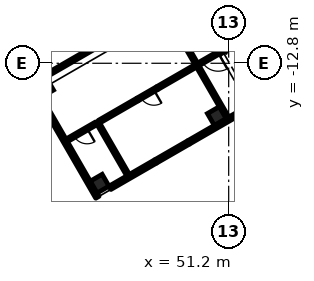
"""IFC4 building model, lengths in metres.
Left out: names, types, materials, properties, quantities, classifications, styles, units other than length and angle.
Written with IfcOpenShell. Run it as: python <this file> out.ifc"""

import sys

from ifc_helpers import new_model, si_unit, direction, frame, frame_2d, origin, origin_2d, place, context, subcontext, project, spatial, rectangle, extrude, element, fill, save


model = new_model("IFC4")
c1 = context("Model", 3, precision=1e-05, world=origin(), true_north=direction((0.0, 1.0)))
c2 = subcontext(c1, "Body", "Model", "MODEL_VIEW")
j1 = project(units=[si_unit("LENGTHUNIT", "METRE"), si_unit("PLANEANGLEUNIT", "RADIAN")], contexts=[c1])
p1 = place(None, origin())
s1 = spatial("IfcSite", under=j1, at=p1, CompositionType="ELEMENT")
p2 = place(p1, origin())
s2 = spatial("IfcBuilding", under=s1, at=p2, CompositionType="ELEMENT")
p3 = place(p2, frame((0.0, 0.0, 16.2)))
s3 = spatial("IfcBuildingStorey", under=s2, at=p3, CompositionType="ELEMENT", Elevation=16.2)
for number, where, z_axis, x_axis in (
    (1, (42.71, -20.721, 0.0), (0.0, 0.0, 1.0), (-0.5, 0.866, 0.0)),
    (2, (50.418, -16.271, 0.0), (0.0, 0.0, 1.0), (-0.5, 0.866, 0.0)),
    (3, (39.061, -14.399, 0.0), (0.0, 0.0, 1.0), (-0.5, 0.866, 0.0)),
):
    element("IfcColumn", number, at=place(p3, frame(where, z_axis=z_axis, x_axis=x_axis)), inside=s3, PredefinedType="COLUMN", context=c2, shape_type="SweptSolid", body=[
        extrude(rectangle(XDim=0.9, YDim=0.9, at=origin_2d()), origin(), (0.0, 0.0, 1.0), 5.4),
    ])
p4 = place(p3, frame((42.562, -21.615, 0.0), z_axis=(0.0, 0.0, 1.0), x_axis=(-0.499999331568, 0.866025789703, 0.0)))
e4 = element("IfcWall", 4, at=p4, inside=s3, PredefinedType="SOLIDWALL", context=c2, shape_type="SweptSolid", body=[
    extrude(rectangle(XDim=8.625, YDim=0.25, at=frame_2d((4.312, 0.0))), origin(), (0.0, 0.0, 1.0), 5.0),
])
p5 = place(p3, frame((46.397, -19.256, 0.0), z_axis=(0.0, 0.0, 1.0), x_axis=(-0.866025305473, -0.500000170281, 0.0)))
e5 = element("IfcWall", 5, at=p5, inside=s3, PredefinedType="SOLIDWALL", context=c2, shape_type="SweptSolid", body=[
    extrude(rectangle(XDim=3.475, YDim=0.25, at=frame_2d((1.738, 0.0))), origin(), (0.0, 0.0, 1.0), 5.0),
])
p6 = place(p3, frame((48.562, -18.006, 0.0), z_axis=(0.0, 0.0, 1.0), x_axis=(-0.866022959057, -0.500004234368, 0.0)))
e6 = element("IfcWall", 6, at=p6, inside=s3, PredefinedType="SOLIDWALL", context=c2, shape_type="SweptSolid", body=[
    extrude(rectangle(XDim=2.5, YDim=0.25, at=frame_2d((1.25, 0.0))), origin(), (0.0, 0.0, 1.0), 5.0),
])
p7 = place(p6, frame((0.25, 0.0, 0.9)))
e7 = element("IfcOpeningElement", 7, at=p7, cuts=e6, PredefinedType="OPENING", context=c2, shape_type="SweptSolid", body=[
    extrude(rectangle(XDim=2.0, YDim=1.8, at=frame_2d((1.0, 0.9))), frame((0.0, 0.135, 0.0), z_axis=(0.0, -1.0, 0.0), x_axis=(1.0, 0.0, 0.0)), (0.0, 0.0, 1.0), 0.27),
])
p8 = place(p3, frame((58.63, -12.194, 0.0), z_axis=(0.0, 0.0, 1.0), x_axis=(-0.866027159341, -0.499996959274, 0.0)))
e8 = element("IfcWall", 8, at=p8, inside=s3, PredefinedType="SOLIDWALL", context=c2, shape_type="SweptSolid", body=[
    extrude(rectangle(XDim=11.625, YDim=0.25, at=frame_2d((5.812, 0.0))), origin(), (0.0, 0.0, 1.0), 5.0),
])
p9 = place(p3, frame((51.119, -16.385, 0.0), z_axis=(0.0, 0.0, 1.0), x_axis=(-0.49999894854, 0.866026010844, 0.0)))
e9 = element("IfcWall", 9, at=p9, inside=s3, PredefinedType="SOLIDWALL", context=c2, shape_type="SweptSolid", body=[
    extrude(rectangle(XDim=4.0, YDim=0.2, at=frame_2d((2.0, 0.0))), origin(), (0.0, 0.0, 1.0), 5.0),
])
p10 = place(p3, frame((50.722, -11.996, 0.0), z_axis=(0.0, 0.0, 1.0), x_axis=(-0.866036909293, -0.499980071345, 0.0)))
e10 = element("IfcWall", 10, at=p10, inside=s3, PredefinedType="SOLIDWALL", context=c2, shape_type="SweptSolid", body=[
    extrude(rectangle(XDim=1.75, YDim=0.2, at=frame_2d((0.875, 0.0))), origin(), (0.0, 0.0, 1.0), 5.0),
])
p11 = place(p10, frame((0.25, 0.0, 0.0)))
e11 = element("IfcOpeningElement", 11, at=p11, cuts=e10, PredefinedType="OPENING", context=c2, shape_type="SweptSolid", body=[
    extrude(rectangle(XDim=1.2, YDim=2.1, at=frame_2d((0.6, 1.05))), frame((0.0, 0.11, 0.0), z_axis=(0.0, -1.0, 0.0), x_axis=(1.0, 0.0, 0.0)), (0.0, 0.0, 1.0), 0.22),
])
p12 = place(p3, frame((50.722, -11.996, 0.0), z_axis=(0.0, 0.0, 1.0), x_axis=(0.866027239912, 0.49999681972, 0.0)))
e12 = element("IfcWall", 12, at=p12, inside=s3, PredefinedType="SOLIDWALL", context=c2, shape_type="SweptSolid", body=[
    extrude(rectangle(XDim=6.65, YDim=0.2, at=frame_2d((3.325, 0.0))), origin(), (0.0, 0.0, 1.0), 5.0),
])
p13 = place(p3, frame((49.07, -12.835, 0.0), z_axis=(0.0, 0.0, 1.0), x_axis=(-0.500062241894, 0.865989465428, 0.0)))
e13 = element("IfcWall", 13, at=p13, inside=s3, PredefinedType="PARTITIONING", context=c2, shape_type="SweptSolid", body=[
    extrude(rectangle(XDim=1.7, YDim=0.2, at=frame_2d((0.85, 0.0))), origin(), (0.0, 0.0, 1.0), 4.1),
])
p14 = place(p3, frame((44.581, -20.16, 0.0), z_axis=(0.0, 0.0, 1.0), x_axis=(-0.49999894854, 0.866026010844, 0.0)))
e14 = element("IfcWall", 14, at=p14, inside=s3, PredefinedType="PARTITIONING", context=c2, shape_type="SweptSolid", body=[
    extrude(rectangle(XDim=4.0, YDim=0.2, at=frame_2d((2.0, 0.0))), origin(), (0.0, 0.0, 1.0), 4.1),
])
p15 = place(p3, frame((42.494, -16.746, 0.0), z_axis=(0.0, 0.0, 1.0), x_axis=(-0.866017533419, -0.500013631625, 0.0)))
e15 = element("IfcWall", 15, at=p15, inside=s3, PredefinedType="PARTITIONING", context=c2, shape_type="SweptSolid", body=[
    extrude(rectangle(XDim=2.25, YDim=0.2, at=frame_2d((1.125, 0.0))), origin(), (0.0, 0.0, 1.0), 4.1),
])
p16 = place(p15, frame((0.7, 0.0, 0.0)))
e16 = element("IfcOpeningElement", 16, at=p16, cuts=e15, PredefinedType="OPENING", context=c2, shape_type="SweptSolid", body=[
    extrude(rectangle(XDim=1.0, YDim=2.1, at=frame_2d((0.5, 1.05))), frame((0.0, 0.11, 0.0), z_axis=(0.0, -1.0, 0.0), x_axis=(1.0, 0.0, 0.0)), (0.0, 0.0, 1.0), 0.22),
])
p17 = place(p3, frame((42.667, -16.646, 0.0), z_axis=(0.0, 0.0, 1.0), x_axis=(0.86601045545, 0.500025890382, 0.0)))
e17 = element("IfcWall", 17, at=p17, inside=s3, PredefinedType="PARTITIONING", context=c2, shape_type="SweptSolid", body=[
    extrude(rectangle(XDim=2.925, YDim=0.2, at=frame_2d((1.462, 0.0))), origin(), (0.0, 0.0, 1.0), 4.1),
])
p18 = place(p3, frame((46.5, -14.434, 0.0), z_axis=(0.0, 0.0, 1.0), x_axis=(-0.866031096941, -0.499990139034, 0.0)))
e18 = element("IfcWall", 18, at=p18, inside=s3, PredefinedType="PARTITIONING", context=c2, shape_type="SweptSolid", body=[
    extrude(rectangle(XDim=1.5, YDim=0.2, at=frame_2d((0.75, 0.0))), origin(), (0.0, 0.0, 1.0), 4.1),
])
p19 = place(p18, frame((0.25, 0.0, 0.0)))
e19 = element("IfcOpeningElement", 19, at=p19, cuts=e18, PredefinedType="OPENING", context=c2, shape_type="SweptSolid", body=[
    extrude(rectangle(XDim=1.0, YDim=2.1, at=frame_2d((0.5, 1.05))), frame((0.0, 0.11, 0.0), z_axis=(0.0, -1.0, 0.0), x_axis=(1.0, 0.0, 0.0)), (0.0, 0.0, 1.0), 0.22),
])
p20 = place(p3, frame((46.5, -14.434, 0.0), z_axis=(0.0, 0.0, 1.0), x_axis=(0.866046596414, 0.499963291492, 0.0)))
e20 = element("IfcWall", 20, at=p20, inside=s3, PredefinedType="PARTITIONING", context=c2, shape_type="SweptSolid", body=[
    extrude(rectangle(XDim=2.925, YDim=0.2, at=frame_2d((1.462, 0.0))), origin(), (0.0, 0.0, 1.0), 4.1),
])
p21 = place(p3, frame((38.358, -14.083, 0.0), z_axis=(0.0, 0.0, 1.0), x_axis=(0.866024244032, 0.500002008745, 0.0)))
e21 = element("IfcWall", 21, at=p21, inside=s3, PredefinedType="PARTITIONING", context=c2, shape_type="SweptSolid", body=[
    extrude(rectangle(XDim=47.5, YDim=0.2, at=frame_2d((23.75, 0.0))), origin(), (0.0, 0.0, 1.0), 4.1),
])
p22 = place(p7, origin())
e22 = element("IfcWindow", 22, at=p22, inside=s3, PartitioningType="SINGLE_PANEL", PredefinedType="WINDOW", context=c2, shape_type="SweptSolid", body=[
    extrude(rectangle(XDim=2.0, YDim=1.8, at=frame_2d((1.0, 0.9))), frame((0.0, 0.03, 0.0), z_axis=(0.0, -1.0, 0.0), x_axis=(1.0, 0.0, 0.0)), (0.0, 0.0, 1.0), 0.06),
])
fill(e7, e22)
p23 = place(p11, origin())
e23 = element("IfcDoor", 23, at=p23, inside=s3, OperationType="SINGLE_SWING_LEFT", PredefinedType="DOOR", context=c2, shape_type="SweptSolid", body=[
    extrude(rectangle(XDim=1.2, YDim=2.1, at=frame_2d((0.6, 1.05))), frame((0.0, 0.025, 0.0), z_axis=(0.0, -1.0, 0.0), x_axis=(1.0, 0.0, 0.0)), (0.0, 0.0, 1.0), 0.05),
])
fill(e11, e23)
p24 = place(p16, origin())
e24 = element("IfcDoor", 24, at=p24, inside=s3, OperationType="SINGLE_SWING_LEFT", PredefinedType="DOOR", context=c2, shape_type="SweptSolid", body=[
    extrude(rectangle(XDim=1.0, YDim=2.1, at=frame_2d((0.5, 1.05))), frame((0.0, 0.025, 0.0), z_axis=(0.0, -1.0, 0.0), x_axis=(1.0, 0.0, 0.0)), (0.0, 0.0, 1.0), 0.05),
])
fill(e16, e24)
p25 = place(p19, origin())
e25 = element("IfcDoor", 25, at=p25, inside=s3, OperationType="SINGLE_SWING_LEFT", PredefinedType="DOOR", context=c2, shape_type="SweptSolid", body=[
    extrude(rectangle(XDim=1.0, YDim=2.1, at=frame_2d((0.5, 1.05))), frame((0.0, 0.025, 0.0), z_axis=(0.0, -1.0, 0.0), x_axis=(1.0, 0.0, 0.0)), (0.0, 0.0, 1.0), 0.05),
])
fill(e19, e25)
save(model, sys.argv[1])
